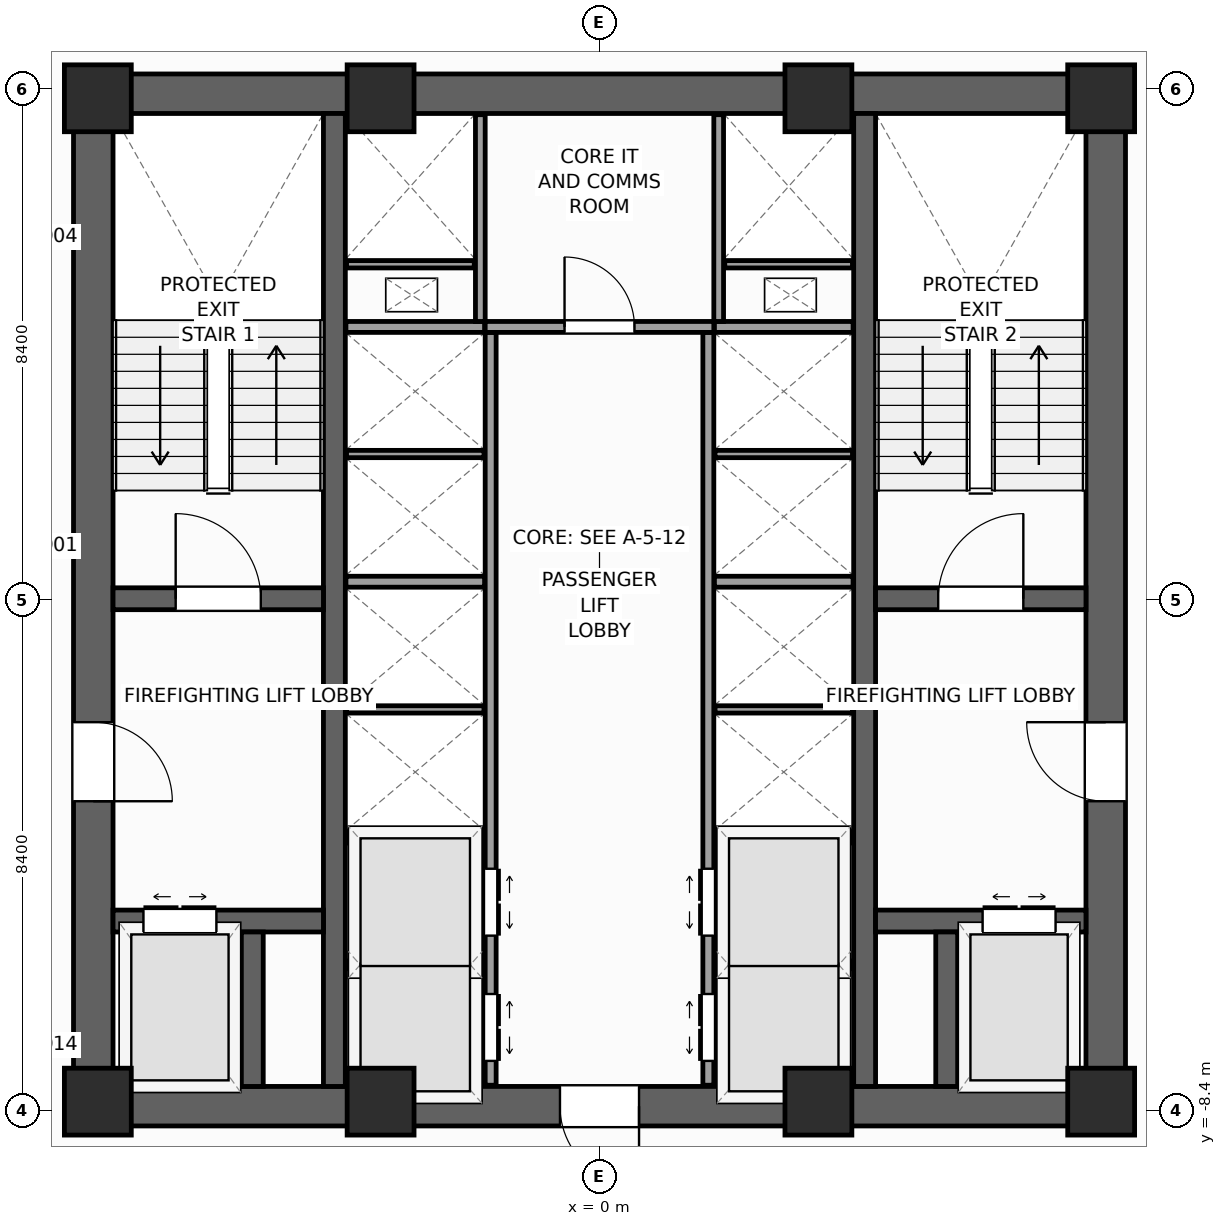
"""IFC4 building model, lengths in metres.
Left out: names, types, materials, properties, quantities, classifications, styles, units other than length and angle.
Written with IfcOpenShell. Run it as: python <this file> out.ifc"""

import sys

from ifc_helpers import new_model, si_unit, direction, frame, frame_2d, origin, origin_2d, place, context, subcontext, project, spatial, rectangle, extrude, source, transform, mapped, element, fill, save


model = new_model("IFC4")
c1 = context("Model", 3, precision=1e-05, world=origin(), true_north=direction((0.0, 1.0)))
c2 = subcontext(c1, "Body", "Model", "MODEL_VIEW")
j1 = project(units=[si_unit("LENGTHUNIT", "METRE"), si_unit("PLANEANGLEUNIT", "RADIAN")], contexts=[c1])
p1 = place(None, origin())
s1 = spatial("IfcSite", under=j1, at=p1, CompositionType="ELEMENT")
p2 = place(p1, origin())
s2 = spatial("IfcBuilding", under=s1, at=p2, CompositionType="ELEMENT")
p3 = place(p2, frame((0.0, 0.0, 123.2)))
s3 = spatial("IfcBuildingStorey", under=s2, at=p3, CompositionType="ELEMENT", Elevation=123.2)
p4 = place(p3, frame((-8.65, -8.325, 0.0), z_axis=(0.0, 0.0, 1.0), x_axis=(1.0, 0.0, 0.0)))
e1 = element("IfcWall", 1, at=p4, inside=s3, PredefinedType="SHEAR", context=c2, shape_type="SweptSolid", body=[
    extrude(rectangle(XDim=17.3, YDim=0.65, at=frame_2d((8.65, 0.0))), origin(), (0.0, 0.0, 1.0), 4.0),
])
p5 = place(p4, frame((8.0, 0.0, 0.0)))
e2 = element("IfcOpeningElement", 2, at=p5, cuts=e1, PredefinedType="OPENING", context=c2, shape_type="SweptSolid", body=[
    extrude(rectangle(XDim=1.3, YDim=2.2, at=frame_2d((0.65, 1.1))), frame((0.0, 0.335, 0.0), z_axis=(0.0, -1.0, 0.0), x_axis=(1.0, 0.0, 0.0)), (0.0, 0.0, 1.0), 0.67),
])
p6 = place(p3, frame((-8.65, 8.325, 0.0), z_axis=(0.0, 0.0, 1.0), x_axis=(1.0, 0.0, 0.0)))
e3 = element("IfcWall", 3, at=p6, inside=s3, PredefinedType="SHEAR", context=c2, shape_type="SweptSolid", body=[
    extrude(rectangle(XDim=17.3, YDim=0.65, at=frame_2d((8.65, 0.0))), origin(), (0.0, 0.0, 1.0), 4.0),
])
p7 = place(p3, frame((-8.325, -8.0, 0.0), z_axis=(0.0, 0.0, 1.0), x_axis=(0.0, 1.0, 0.0)))
e4 = element("IfcWall", 4, at=p7, inside=s3, PredefinedType="SHEAR", context=c2, shape_type="SweptSolid", body=[
    extrude(rectangle(XDim=16.0, YDim=0.65, at=frame_2d((8.0, 0.0))), origin(), (0.0, 0.0, 1.0), 4.0),
])
p8 = place(p7, frame((4.69, 0.0, 0.0)))
e5 = element("IfcOpeningElement", 5, at=p8, cuts=e4, PredefinedType="OPENING", context=c2, shape_type="SweptSolid", body=[
    extrude(rectangle(XDim=1.3, YDim=2.2, at=frame_2d((0.65, 1.1))), frame((0.0, 0.335, 0.0), z_axis=(0.0, -1.0, 0.0), x_axis=(1.0, 0.0, 0.0)), (0.0, 0.0, 1.0), 0.67),
])
p9 = place(p3, frame((8.325, -8.0, 0.0), z_axis=(0.0, 0.0, 1.0), x_axis=(0.0, 1.0, 0.0)))
e6 = element("IfcWall", 6, at=p9, inside=s3, PredefinedType="SHEAR", context=c2, shape_type="SweptSolid", body=[
    extrude(rectangle(XDim=16.0, YDim=0.65, at=frame_2d((8.0, 0.0))), origin(), (0.0, 0.0, 1.0), 4.0),
])
p10 = place(p9, frame((4.69, 0.0, 0.0)))
e7 = element("IfcOpeningElement", 7, at=p10, cuts=e6, PredefinedType="OPENING", context=c2, shape_type="SweptSolid", body=[
    extrude(rectangle(XDim=1.3, YDim=2.2, at=frame_2d((0.65, 1.1))), frame((0.0, 0.335, 0.0), z_axis=(0.0, -1.0, 0.0), x_axis=(1.0, 0.0, 0.0)), (0.0, 0.0, 1.0), 0.67),
])
for number, where, z_axis, x_axis in (
    (8, (-4.36, -8.0, 0.0), (0.0, 0.0, 1.0), (0.0, 1.0, 0.0)),
    (9, (4.36, -8.0, 0.0), (0.0, 0.0, 1.0), (0.0, 1.0, 0.0)),
):
    element("IfcWall", number, at=place(p3, frame(where, z_axis=z_axis, x_axis=x_axis)), inside=s3, PredefinedType="SHEAR", context=c2, shape_type="SweptSolid", body=[
        extrude(rectangle(XDim=16.0, YDim=0.36, at=frame_2d((8.0, 0.0))), origin(), (0.0, 0.0, 1.0), 4.0),
    ])
p11 = place(p3, frame((-8.0, 0.02, 0.0), z_axis=(0.0, 0.0, 1.0), x_axis=(1.0, 0.0, 0.0)))
e10 = element("IfcWall", 10, at=p11, inside=s3, PredefinedType="SHEAR", context=c2, shape_type="SweptSolid", body=[
    extrude(rectangle(XDim=3.46, YDim=0.36, at=frame_2d((1.73, 0.0))), origin(), (0.0, 0.0, 1.0), 4.0),
])
p12 = place(p11, frame((1.03, 0.0, 0.0)))
e11 = element("IfcOpeningElement", 11, at=p12, cuts=e10, PredefinedType="OPENING", context=c2, shape_type="SweptSolid", body=[
    extrude(rectangle(XDim=1.4, YDim=2.2, at=frame_2d((0.7, 1.1))), frame((0.0, 0.19, 0.0), z_axis=(0.0, -1.0, 0.0), x_axis=(1.0, 0.0, 0.0)), (0.0, 0.0, 1.0), 0.38),
])
p13 = place(p3, frame((4.54, 0.02, 0.0), z_axis=(0.0, 0.0, 1.0), x_axis=(1.0, 0.0, 0.0)))
e12 = element("IfcWall", 12, at=p13, inside=s3, PredefinedType="SHEAR", context=c2, shape_type="SweptSolid", body=[
    extrude(rectangle(XDim=3.46, YDim=0.36, at=frame_2d((1.73, 0.0))), origin(), (0.0, 0.0, 1.0), 4.0),
])
p14 = place(p13, frame((1.03, 0.0, 0.0)))
e13 = element("IfcOpeningElement", 13, at=p14, cuts=e12, PredefinedType="OPENING", context=c2, shape_type="SweptSolid", body=[
    extrude(rectangle(XDim=1.4, YDim=2.2, at=frame_2d((0.7, 1.1))), frame((0.0, 0.19, 0.0), z_axis=(0.0, -1.0, 0.0), x_axis=(1.0, 0.0, 0.0)), (0.0, 0.0, 1.0), 0.38),
])
p15 = place(p3, frame((-8.0, -5.28, 0.0), z_axis=(0.0, 0.0, 1.0), x_axis=(1.0, 0.0, 0.0)))
e14 = element("IfcWall", 14, at=p15, inside=s3, PredefinedType="SHEAR", context=c2, shape_type="SweptSolid", body=[
    extrude(rectangle(XDim=3.46, YDim=0.36, at=frame_2d((1.73, 0.0))), origin(), (0.0, 0.0, 1.0), 4.0),
])
p16 = place(p15, frame((0.5, 0.0, 0.0)))
e15 = element("IfcOpeningElement", 15, at=p16, cuts=e14, PredefinedType="OPENING", context=c2, shape_type="SweptSolid", body=[
    extrude(rectangle(XDim=1.2, YDim=2.25, at=frame_2d((0.6, 1.125))), frame((0.0, 0.19, 0.0), z_axis=(0.0, -1.0, 0.0), x_axis=(1.0, 0.0, 0.0)), (0.0, 0.0, 1.0), 0.38),
])
p17 = place(p3, frame((4.54, -5.28, 0.0), z_axis=(0.0, 0.0, 1.0), x_axis=(1.0, 0.0, 0.0)))
e16 = element("IfcWall", 16, at=p17, inside=s3, PredefinedType="SHEAR", context=c2, shape_type="SweptSolid", body=[
    extrude(rectangle(XDim=3.46, YDim=0.36, at=frame_2d((1.73, 0.0))), origin(), (0.0, 0.0, 1.0), 4.0),
])
p18 = place(p17, frame((1.76, 0.0, 0.0)))
e17 = element("IfcOpeningElement", 17, at=p18, cuts=e16, PredefinedType="OPENING", context=c2, shape_type="SweptSolid", body=[
    extrude(rectangle(XDim=1.2, YDim=2.25, at=frame_2d((0.6, 1.125))), frame((0.0, 0.19, 0.0), z_axis=(0.0, -1.0, 0.0), x_axis=(1.0, 0.0, 0.0)), (0.0, 0.0, 1.0), 0.38),
])
for number, where, z_axis, x_axis in (
    (18, (-5.71, -8.0, 0.0), (0.0, 0.0, 1.0), (0.0, 1.0, 0.0)),
    (19, (5.71, -8.0, 0.0), (0.0, 0.0, 1.0), (0.0, 1.0, 0.0)),
):
    element("IfcWall", number, at=place(p3, frame(where, z_axis=z_axis, x_axis=x_axis)), inside=s3, PredefinedType="SHEAR", context=c2, shape_type="SweptSolid", body=[
        extrude(rectangle(XDim=2.54, YDim=0.36, at=frame_2d((1.27, 0.0))), origin(), (0.0, 0.0, 1.0), 4.0),
    ])
m1 = source(origin(), c2, "Body", "SweptSolid", [
    extrude(rectangle(XDim=1.1, YDim=1.1, at=origin_2d()), origin(), (0.0, 0.0, 1.0), 4.0),
])
for number, where, z_axis, x_axis in (
    (20, (-8.25, -8.25, 0.0), (0.0, 0.0, 1.0), (1.0, 0.0, 0.0)),
    (21, (8.25, -8.25, 0.0), (0.0, 0.0, 1.0), (1.0, 0.0, 0.0)),
    (22, (8.25, 8.25, 0.0), (0.0, 0.0, 1.0), (1.0, 0.0, 0.0)),
    (23, (-8.25, 8.25, 0.0), (0.0, 0.0, 1.0), (1.0, 0.0, 0.0)),
    (24, (-3.6, -8.25, 0.0), (0.0, 0.0, 1.0), (1.0, 0.0, 0.0)),
    (25, (3.6, -8.25, 0.0), (0.0, 0.0, 1.0), (1.0, 0.0, 0.0)),
    (26, (-3.6, 8.25, 0.0), (0.0, 0.0, 1.0), (1.0, 0.0, 0.0)),
    (27, (3.6, 8.25, 0.0), (0.0, 0.0, 1.0), (1.0, 0.0, 0.0)),
):
    element("IfcColumn", number, at=place(p3, frame(where, z_axis=z_axis, x_axis=x_axis)), inside=s3, PredefinedType="PILASTER", context=c2, shape_type="MappedRepresentation", body=[
        mapped(m1, transform((0.0, 0.0, 0.0), scale=1.0)),
    ])
p19 = place(p3, frame((-1.79, -7.98, 0.0), z_axis=(0.0, 0.0, 1.0), x_axis=(0.0, 1.0, 0.0)))
e28 = element("IfcWall", 28, at=p19, inside=s3, PredefinedType="PARTITIONING", context=c2, shape_type="SweptSolid", body=[
    extrude(rectangle(XDim=12.38, YDim=0.18, at=frame_2d((6.19, 0.0))), origin(), (0.0, 0.0, 1.0), 3.74),
])
p20 = place(p19, frame((0.4, 0.0, 0.0)))
e29 = element("IfcOpeningElement", 29, at=p20, cuts=e28, PredefinedType="OPENING", context=c2, shape_type="SweptSolid", body=[
    extrude(rectangle(XDim=1.1, YDim=2.2, at=frame_2d((0.55, 1.1))), frame((0.0, 0.1, 0.0), z_axis=(0.0, -1.0, 0.0), x_axis=(1.0, 0.0, 0.0)), (0.0, 0.0, 1.0), 0.2),
])
p21 = place(p19, frame((2.46, 0.0, 0.0)))
e30 = element("IfcOpeningElement", 30, at=p21, cuts=e28, PredefinedType="OPENING", context=c2, shape_type="SweptSolid", body=[
    extrude(rectangle(XDim=1.1, YDim=2.2, at=frame_2d((0.55, 1.1))), frame((0.0, 0.1, 0.0), z_axis=(0.0, -1.0, 0.0), x_axis=(1.0, 0.0, 0.0)), (0.0, 0.0, 1.0), 0.2),
])
p22 = place(p3, frame((1.79, -7.98, 0.0), z_axis=(0.0, 0.0, 1.0), x_axis=(0.0, 1.0, 0.0)))
e31 = element("IfcWall", 31, at=p22, inside=s3, PredefinedType="PARTITIONING", context=c2, shape_type="SweptSolid", body=[
    extrude(rectangle(XDim=12.38, YDim=0.18, at=frame_2d((6.19, 0.0))), origin(), (0.0, 0.0, 1.0), 3.74),
])
p23 = place(p22, frame((0.4, 0.0, 0.0)))
e32 = element("IfcOpeningElement", 32, at=p23, cuts=e31, PredefinedType="OPENING", context=c2, shape_type="SweptSolid", body=[
    extrude(rectangle(XDim=1.1, YDim=2.2, at=frame_2d((0.55, 1.1))), frame((0.0, 0.1, 0.0), z_axis=(0.0, -1.0, 0.0), x_axis=(1.0, 0.0, 0.0)), (0.0, 0.0, 1.0), 0.2),
])
p24 = place(p22, frame((2.46, 0.0, 0.0)))
e33 = element("IfcOpeningElement", 33, at=p24, cuts=e31, PredefinedType="OPENING", context=c2, shape_type="SweptSolid", body=[
    extrude(rectangle(XDim=1.1, YDim=2.2, at=frame_2d((0.55, 1.1))), frame((0.0, 0.1, 0.0), z_axis=(0.0, -1.0, 0.0), x_axis=(1.0, 0.0, 0.0)), (0.0, 0.0, 1.0), 0.2),
])
p25 = place(p3, frame((-1.88, 4.49, 0.0), z_axis=(0.0, 0.0, 1.0), x_axis=(1.0, 0.0, 0.0)))
e34 = element("IfcWall", 34, at=p25, inside=s3, PredefinedType="PARTITIONING", context=c2, shape_type="SweptSolid", body=[
    extrude(rectangle(XDim=3.76, YDim=0.18, at=frame_2d((1.88, 0.0))), origin(), (0.0, 0.0, 1.0), 3.74),
])
p26 = place(p25, frame((1.305, 0.0, 0.0)))
e35 = element("IfcOpeningElement", 35, at=p26, cuts=e34, PredefinedType="OPENING", context=c2, shape_type="SweptSolid", body=[
    extrude(rectangle(XDim=1.15, YDim=2.25, at=frame_2d((0.575, 1.125))), frame((0.0, 0.1, 0.0), z_axis=(0.0, -1.0, 0.0), x_axis=(1.0, 0.0, 0.0)), (0.0, 0.0, 1.0), 0.2),
])
for number, where, z_axis, x_axis in (
    (36, (-4.17, -3.9, 0.0), (0.0, 0.0, 1.0), (1.0, 0.0, 0.0)),
    (37, (1.89, -3.9, 0.0), (0.0, 0.0, 1.0), (1.0, 0.0, 0.0)),
    (38, (-4.17, 0.3, 0.0), (0.0, 0.0, 1.0), (1.0, 0.0, 0.0)),
    (39, (1.89, 0.3, 0.0), (0.0, 0.0, 1.0), (1.0, 0.0, 0.0)),
    (40, (-4.17, 4.49, 0.0), (0.0, 0.0, 1.0), (1.0, 0.0, 0.0)),
    (41, (1.89, 4.49, 0.0), (0.0, 0.0, 1.0), (1.0, 0.0, 0.0)),
):
    element("IfcWall", number, at=place(p3, frame(where, z_axis=z_axis, x_axis=x_axis)), inside=s3, PredefinedType="PARTITIONING", context=c2, shape_type="SweptSolid", body=[
        extrude(rectangle(XDim=2.28, YDim=0.18, at=frame_2d((1.14, 0.0))), origin(), (0.0, 0.0, 1.0), 3.74),
    ])
for number, where, z_axis, x_axis in (
    (42, (-4.16, -6.0, 0.0), (0.0, 0.0, 1.0), (1.0, 0.0, 0.0)),
    (43, (1.9, -6.0, 0.0), (0.0, 0.0, 1.0), (1.0, 0.0, 0.0)),
    (44, (-4.16, -1.8, 0.0), (0.0, 0.0, 1.0), (1.0, 0.0, 0.0)),
    (45, (1.9, -1.8, 0.0), (0.0, 0.0, 1.0), (1.0, 0.0, 0.0)),
    (46, (-4.16, 2.4, 0.0), (0.0, 0.0, 1.0), (1.0, 0.0, 0.0)),
    (47, (1.9, 2.4, 0.0), (0.0, 0.0, 1.0), (1.0, 0.0, 0.0)),
):
    element("IfcWall", number, at=place(p3, frame(where, z_axis=z_axis, x_axis=x_axis)), inside=s3, PredefinedType="PARTITIONING", context=c2, shape_type="SweptSolid", body=[
        extrude(rectangle(XDim=2.26, YDim=0.12, at=frame_2d((1.13, 0.0))), origin(), (0.0, 0.0, 1.0), 3.74),
    ])
for number, where, z_axis, x_axis in (
    (48, (-1.96, 4.58, 0.0), (0.0, 0.0, 1.0), (0.0, 1.0, 0.0)),
    (49, (1.96, 4.58, 0.0), (0.0, 0.0, 1.0), (0.0, 1.0, 0.0)),
):
    element("IfcWall", number, at=place(p3, frame(where, z_axis=z_axis, x_axis=x_axis)), inside=s3, PredefinedType="PARTITIONING", context=c2, shape_type="SweptSolid", body=[
        extrude(rectangle(XDim=3.4, YDim=0.16, at=frame_2d((1.7, 0.0))), origin(), (0.0, 0.0, 1.0), 3.74),
    ])
for number, where, z_axis, x_axis in (
    (50, (-4.16, 5.52, 0.0), (0.0, 0.0, 1.0), (1.0, 0.0, 0.0)),
    (51, (2.06, 5.52, 0.0), (0.0, 0.0, 1.0), (1.0, 0.0, 0.0)),
):
    element("IfcWall", number, at=place(p3, frame(where, z_axis=z_axis, x_axis=x_axis)), inside=s3, PredefinedType="PARTITIONING", context=c2, shape_type="SweptSolid", body=[
        extrude(rectangle(XDim=2.1, YDim=0.12, at=frame_2d((1.05, 0.0))), origin(), (0.0, 0.0, 1.0), 3.74),
    ])
m2 = source(origin(), c2, "Body", "SweptSolid", [
    extrude(rectangle(XDim=1.4, YDim=2.2, at=frame_2d((0.7, 1.1))), frame((0.0, 0.025, 0.0), z_axis=(0.0, -1.0, 0.0), x_axis=(1.0, 0.0, 0.0)), (0.0, 0.0, 1.0), 0.05),
])
p27 = place(p12, origin())
e52 = element("IfcDoor", 52, at=p27, inside=s3, OperationType="SINGLE_SWING_LEFT", PredefinedType="DOOR", context=c2, shape_type="MappedRepresentation", body=[
    mapped(m2, transform((0.0, 0.0, 0.0), scale=1.0)),
])
fill(e11, e52)
p28 = place(p14, origin())
e53 = element("IfcDoor", 53, at=p28, inside=s3, OperationType="SINGLE_SWING_RIGHT", PredefinedType="DOOR", context=c2, shape_type="MappedRepresentation", body=[
    mapped(m2, transform((0.0, 0.0, 0.0), scale=1.0)),
])
fill(e13, e53)
m3 = source(origin(), c2, "Body", "SweptSolid", [
    extrude(rectangle(XDim=1.3, YDim=2.2, at=frame_2d((0.65, 1.1))), frame((0.0, 0.025, 0.0), z_axis=(0.0, -1.0, 0.0), x_axis=(1.0, 0.0, 0.0)), (0.0, 0.0, 1.0), 0.05),
])
p29 = place(p8, frame((1.3, 0.0, 0.0), z_axis=(0.0, 0.0, 1.0), x_axis=(-1.0, 0.0, 0.0)))
e54 = element("IfcDoor", 54, at=p29, inside=s3, OperationType="SINGLE_SWING_LEFT", PredefinedType="DOOR", context=c2, shape_type="MappedRepresentation", body=[
    mapped(m3, transform((0.0, 0.0, 0.0), scale=1.0)),
])
fill(e5, e54)
p30 = place(p10, origin())
e55 = element("IfcDoor", 55, at=p30, inside=s3, OperationType="SINGLE_SWING_RIGHT", PredefinedType="DOOR", context=c2, shape_type="MappedRepresentation", body=[
    mapped(m3, transform((0.0, 0.0, 0.0), scale=1.0)),
])
fill(e7, e55)
p31 = place(p5, frame((1.3, 0.0, 0.0), z_axis=(0.0, 0.0, 1.0), x_axis=(-1.0, 0.0, 0.0)))
e56 = element("IfcDoor", 56, at=p31, inside=s3, OperationType="SINGLE_SWING_RIGHT", PredefinedType="DOOR", context=c2, shape_type="MappedRepresentation", body=[
    mapped(m3, transform((0.0, 0.0, 0.0), scale=1.0)),
])
fill(e2, e56)
m4 = source(origin(), c2, "Body", "SweptSolid", [
    extrude(rectangle(XDim=1.2, YDim=2.25, at=frame_2d((0.6, 1.125))), frame((0.0, 0.025, 0.0), z_axis=(0.0, -1.0, 0.0), x_axis=(1.0, 0.0, 0.0)), (0.0, 0.0, 1.0), 0.05),
])
p32 = place(p16, origin())
e57 = element("IfcDoor", 57, at=p32, inside=s3, OperationType="DOUBLE_DOOR_SLIDING", PredefinedType="DOOR", context=c2, shape_type="MappedRepresentation", body=[
    mapped(m4, transform((0.0, 0.0, 0.0), scale=1.0)),
])
fill(e15, e57)
p33 = place(p18, origin())
e58 = element("IfcDoor", 58, at=p33, inside=s3, OperationType="DOUBLE_DOOR_SLIDING", PredefinedType="DOOR", context=c2, shape_type="MappedRepresentation", body=[
    mapped(m4, transform((0.0, 0.0, 0.0), scale=1.0)),
])
fill(e17, e58)
m5 = source(origin(), c2, "Body", "SweptSolid", [
    extrude(rectangle(XDim=1.1, YDim=2.2, at=frame_2d((0.55, 1.1))), frame((0.0, 0.025, 0.0), z_axis=(0.0, -1.0, 0.0), x_axis=(1.0, 0.0, 0.0)), (0.0, 0.0, 1.0), 0.05),
])
p34 = place(p20, frame((1.1, 0.0, 0.0), z_axis=(0.0, 0.0, 1.0), x_axis=(-1.0, 0.0, 0.0)))
e59 = element("IfcDoor", 59, at=p34, inside=s3, OperationType="DOUBLE_DOOR_SLIDING", PredefinedType="DOOR", context=c2, shape_type="MappedRepresentation", body=[
    mapped(m5, transform((0.0, 0.0, 0.0), scale=1.0)),
])
fill(e29, e59)
p35 = place(p21, frame((1.1, 0.0, 0.0), z_axis=(0.0, 0.0, 1.0), x_axis=(-1.0, 0.0, 0.0)))
e60 = element("IfcDoor", 60, at=p35, inside=s3, OperationType="DOUBLE_DOOR_SLIDING", PredefinedType="DOOR", context=c2, shape_type="MappedRepresentation", body=[
    mapped(m5, transform((0.0, 0.0, 0.0), scale=1.0)),
])
fill(e30, e60)
p36 = place(p23, origin())
e61 = element("IfcDoor", 61, at=p36, inside=s3, OperationType="DOUBLE_DOOR_SLIDING", PredefinedType="DOOR", context=c2, shape_type="MappedRepresentation", body=[
    mapped(m5, transform((0.0, 0.0, 0.0), scale=1.0)),
])
fill(e32, e61)
p37 = place(p24, origin())
e62 = element("IfcDoor", 62, at=p37, inside=s3, OperationType="DOUBLE_DOOR_SLIDING", PredefinedType="DOOR", context=c2, shape_type="MappedRepresentation", body=[
    mapped(m5, transform((0.0, 0.0, 0.0), scale=1.0)),
])
fill(e33, e62)
m6 = source(origin(), c2, "Body", "SweptSolid", [
    extrude(rectangle(XDim=1.15, YDim=2.25, at=frame_2d((0.575, 1.125))), frame((0.0, 0.025, 0.0), z_axis=(0.0, -1.0, 0.0), x_axis=(1.0, 0.0, 0.0)), (0.0, 0.0, 1.0), 0.05),
])
p38 = place(p26, origin())
e63 = element("IfcDoor", 63, at=p38, inside=s3, OperationType="SINGLE_SWING_LEFT", PredefinedType="DOOR", context=c2, shape_type="MappedRepresentation", body=[
    mapped(m6, transform((0.0, 0.0, 0.0), scale=1.0)),
])
fill(e35, e63)
save(model, sys.argv[1])
